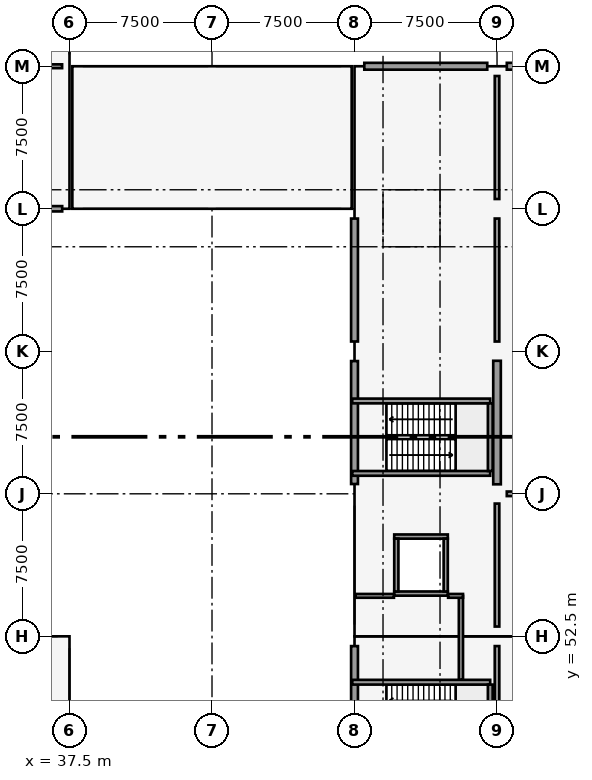
"""IFC4 building model, lengths in metres.
Left out: names, types, materials, properties, quantities, classifications, styles, units other than length and angle.
Written with IfcOpenShell. Run it as: python <this file> out.ifc"""

import sys

from ifc_helpers import new_model, si_unit, direction, frame, frame_2d, origin, origin_2d, place, context, subcontext, project, spatial, rectangle, extrude, element, fill, save


model = new_model("IFC4")
c1 = context("Model", 3, precision=1e-05, world=origin(), true_north=direction((0.0, 1.0)))
c2 = subcontext(c1, "Body", "Model", "MODEL_VIEW")
j1 = project(units=[si_unit("LENGTHUNIT", "METRE"), si_unit("PLANEANGLEUNIT", "RADIAN")], contexts=[c1])
p1 = place(None, origin())
s1 = spatial("IfcSite", under=j1, at=p1, CompositionType="ELEMENT")
p2 = place(p1, origin())
s2 = spatial("IfcBuilding", under=s1, at=p2, CompositionType="ELEMENT")
p3 = place(p2, origin())
s3 = spatial("IfcBuildingStorey", under=s2, at=p3, CompositionType="ELEMENT", Elevation=0.0)
for number, where, z_axis, x_axis in (
    (1, (52.5, 52.5, 0.0), (0.0, 0.0, 1.0), (1.0, 0.0, 0.0)),
    (2, (52.5, 60.0, 0.0), (0.0, 0.0, 1.0), (1.0, 0.0, 0.0)),
    (3, (52.5, 67.5, 0.0), (0.0, 0.0, 1.0), (1.0, 0.0, 0.0)),
    (4, (52.5, 75.0, 0.0), (0.0, 0.0, 1.0), (1.0, 0.0, 0.0)),
    (5, (52.5, 82.5, 0.0), (0.0, 0.0, 1.0), (1.0, 0.0, 0.0)),
    (6, (60.0, 52.5, 0.0), (0.0, 0.0, 1.0), (1.0, 0.0, 0.0)),
    (7, (60.0, 60.0, 0.0), (0.0, 0.0, 1.0), (1.0, 0.0, 0.0)),
    (8, (60.0, 67.5, 0.0), (0.0, 0.0, 1.0), (1.0, 0.0, 0.0)),
    (9, (60.0, 75.0, 0.0), (0.0, 0.0, 1.0), (1.0, 0.0, 0.0)),
    (10, (60.0, 82.5, 0.0), (0.0, 0.0, 1.0), (1.0, 0.0, 0.0)),
):
    element("IfcColumn", number, at=place(p3, frame(where, z_axis=z_axis, x_axis=x_axis)), inside=s3, PredefinedType="COLUMN", context=c2, shape_type="SweptSolid", body=[
        extrude(rectangle(XDim=1.0, YDim=1.0, at=origin_2d()), origin(), (0.0, 0.0, 1.0), 4.8),
    ])
for number, where, z_axis, x_axis in (
    (11, (37.5, 52.5, 0.0), (0.0, 0.0, 1.0), (1.0, 0.0, 0.0)),
    (12, (37.5, 75.0, 0.0), (0.0, 0.0, 1.0), (1.0, 0.0, 0.0)),
    (13, (37.5, 82.5, 0.0), (0.0, 0.0, 1.0), (1.0, 0.0, 0.0)),
):
    element("IfcColumn", number, at=place(p3, frame(where, z_axis=z_axis, x_axis=x_axis)), inside=s3, PredefinedType="COLUMN", context=c2, shape_type="SweptSolid", body=[
        extrude(rectangle(XDim=0.75, YDim=0.75, at=origin_2d()), origin(), (0.0, 0.0, 1.0), 4.8),
    ])
p4 = place(p3, frame((52.5, 71.25, 0.0), z_axis=(0.0, 0.0, 1.0), x_axis=(1.0, 0.0, 0.0)))
e14 = element("IfcColumn", 14, at=p4, inside=s3, PredefinedType="PILASTER", context=c2, shape_type="SweptSolid", body=[
    extrude(rectangle(XDim=0.45, YDim=0.85, at=origin_2d()), origin(), (0.0, 0.0, 1.0), 4.8),
])
p5 = place(p3, frame((60.0, 60.5, 0.0), z_axis=(0.0, 0.0, 1.0), x_axis=(0.0, 1.0, 0.0)))
e15 = element("IfcWall", 15, at=p5, inside=s3, PredefinedType="SHEAR", context=c2, shape_type="SweptSolid", body=[
    extrude(rectangle(XDim=6.5, YDim=0.4, at=frame_2d((3.25, 0.0))), origin(), (0.0, 0.0, 1.0), 3.0),
])
p6 = place(p3, frame((52.5, 45.515, 0.0), z_axis=(0.0, 0.0, 1.0), x_axis=(0.0, 1.0, 0.0)))
e16 = element("IfcWall", 16, at=p6, inside=s3, PredefinedType="SOLIDWALL", context=c2, shape_type="SweptSolid", body=[
    extrude(rectangle(XDim=6.47, YDim=0.36, at=frame_2d((3.235, 0.0))), origin(), (0.0, 0.0, 1.0), 3.67),
])
p7 = place(p6, frame((2.022, 0.0, 0.0)))
e17 = element("IfcOpeningElement", 17, at=p7, cuts=e16, PredefinedType="OPENING", context=c2, shape_type="SweptSolid", body=[
    extrude(rectangle(XDim=1.8, YDim=2.2, at=frame_2d((0.9, 1.1))), frame((0.0, 0.19, 0.0), z_axis=(0.0, -1.0, 0.0), x_axis=(1.0, 0.0, 0.0)), (0.0, 0.0, 1.0), 0.38),
])
p8 = place(p3, frame((52.5, 60.515, 0.0), z_axis=(0.0, 0.0, 1.0), x_axis=(0.0, 1.0, 0.0)))
e18 = element("IfcWall", 18, at=p8, inside=s3, PredefinedType="SOLIDWALL", context=c2, shape_type="SweptSolid", body=[
    extrude(rectangle(XDim=6.47, YDim=0.36, at=frame_2d((3.235, 0.0))), origin(), (0.0, 0.0, 1.0), 3.67),
])
p9 = place(p8, frame((2.022, 0.0, 0.0)))
e19 = element("IfcOpeningElement", 19, at=p9, cuts=e18, PredefinedType="OPENING", context=c2, shape_type="SweptSolid", body=[
    extrude(rectangle(XDim=1.8, YDim=2.2, at=frame_2d((0.9, 1.1))), frame((0.0, 0.19, 0.0), z_axis=(0.0, -1.0, 0.0), x_axis=(1.0, 0.0, 0.0)), (0.0, 0.0, 1.0), 0.38),
])
p10 = place(p3, frame((52.5, 68.015, 0.0), z_axis=(0.0, 0.0, 1.0), x_axis=(0.0, 1.0, 0.0)))
e20 = element("IfcWall", 20, at=p10, inside=s3, PredefinedType="SOLIDWALL", context=c2, shape_type="SweptSolid", body=[
    extrude(rectangle(XDim=6.47, YDim=0.36, at=frame_2d((3.235, 0.0))), origin(), (0.0, 0.0, 1.0), 3.67),
])
p11 = place(p3, frame((53.015, 82.5, 0.0), z_axis=(0.0, 0.0, 1.0), x_axis=(1.0, 0.0, 0.0)))
e21 = element("IfcWall", 21, at=p11, inside=s3, PredefinedType="SOLIDWALL", context=c2, shape_type="SweptSolid", body=[
    extrude(rectangle(XDim=6.47, YDim=0.36, at=frame_2d((3.235, 0.0))), origin(), (0.0, 0.0, 1.0), 3.72),
])
p12 = place(p11, frame((2.685, 0.0, 0.6)))
e22 = element("IfcOpeningElement", 22, at=p12, cuts=e21, PredefinedType="OPENING", context=c2, shape_type="SweptSolid", body=[
    extrude(rectangle(XDim=1.1, YDim=1.8, at=frame_2d((0.55, 0.9))), frame((0.0, 0.19, 0.0), z_axis=(0.0, -1.0, 0.0), x_axis=(1.0, 0.0, 0.0)), (0.0, 0.0, 1.0), 0.38),
])
p13 = place(p3, frame((60.515, 82.5, 0.0), z_axis=(0.0, 0.0, 1.0), x_axis=(1.0, 0.0, 0.0)))
e23 = element("IfcWall", 23, at=p13, inside=s3, PredefinedType="SOLIDWALL", context=c2, shape_type="SweptSolid", body=[
    extrude(rectangle(XDim=6.52, YDim=0.36, at=frame_2d((3.26, 0.0))), origin(), (0.0, 0.0, 1.0), 3.72),
])
p14 = place(p13, frame((2.61, 0.0, 0.6)))
e24 = element("IfcOpeningElement", 24, at=p14, cuts=e23, PredefinedType="OPENING", context=c2, shape_type="SweptSolid", body=[
    extrude(rectangle(XDim=1.25, YDim=1.8, at=frame_2d((0.625, 0.9))), frame((0.0, 0.19, 0.0), z_axis=(0.0, -1.0, 0.0), x_axis=(1.0, 0.0, 0.0)), (0.0, 0.0, 1.0), 0.38),
])
p15 = place(p3, frame((30.385, 75.0, 0.0), z_axis=(0.0, 0.0, 1.0), x_axis=(1.0, 0.0, 0.0)))
e25 = element("IfcWall", 25, at=p15, inside=s3, PredefinedType="SOLIDWALL", context=c2, shape_type="SweptSolid", body=[
    extrude(rectangle(XDim=6.73, YDim=0.28, at=frame_2d((3.365, 0.0))), origin(), (0.0, 0.0, 1.0), 3.72),
])
p16 = place(p15, frame((2.79, 0.0, 0.6)))
e26 = element("IfcOpeningElement", 26, at=p16, cuts=e25, PredefinedType="OPENING", context=c2, shape_type="SweptSolid", body=[
    extrude(rectangle(XDim=1.15, YDim=1.3, at=frame_2d((0.575, 0.65))), frame((0.0, 0.15, 0.0), z_axis=(0.0, -1.0, 0.0), x_axis=(1.0, 0.0, 0.0)), (0.0, 0.0, 1.0), 0.3),
])
p17 = place(p3, frame((52.38, 50.085, 0.0), z_axis=(0.0, 0.0, 1.0), x_axis=(1.0, 0.0, 0.0)))
e27 = element("IfcWall", 27, at=p17, inside=s3, PredefinedType="SOLIDWALL", context=c2, shape_type="SweptSolid", body=[
    extrude(rectangle(XDim=7.26, YDim=0.25, at=frame_2d((3.63, 0.0))), origin(), (0.0, 0.0, 1.0), 4.5),
])
p18 = place(p17, frame((0.62, 0.0, 0.0)))
e28 = element("IfcOpeningElement", 28, at=p18, cuts=e27, PredefinedType="OPENING", context=c2, shape_type="SweptSolid", body=[
    extrude(rectangle(XDim=1.1, YDim=2.15, at=frame_2d((0.55, 1.075))), frame((0.0, 0.135, 0.0), z_axis=(0.0, -1.0, 0.0), x_axis=(1.0, 0.0, 0.0)), (0.0, 0.0, 1.0), 0.27),
])
p19 = place(p3, frame((59.645, 46.4, 0.0), z_axis=(0.0, 0.0, 1.0), x_axis=(0.0, 1.0, 0.0)))
e29 = element("IfcWall", 29, at=p19, inside=s3, PredefinedType="SOLIDWALL", context=c2, shape_type="SweptSolid", body=[
    extrude(rectangle(XDim=3.56, YDim=0.25, at=frame_2d((1.78, 0.0))), origin(), (0.0, 0.0, 1.0), 4.5),
])
p20 = place(p3, frame((52.38, 61.075, 0.0), z_axis=(0.0, 0.0, 1.0), x_axis=(1.0, 0.0, 0.0)))
e30 = element("IfcWall", 30, at=p20, inside=s3, PredefinedType="SOLIDWALL", context=c2, shape_type="SweptSolid", body=[
    extrude(rectangle(XDim=7.26, YDim=0.25, at=frame_2d((3.63, 0.0))), origin(), (0.0, 0.0, 1.0), 4.5),
])
p21 = place(p20, frame((0.62, 0.0, 0.0)))
e31 = element("IfcOpeningElement", 31, at=p21, cuts=e30, PredefinedType="OPENING", context=c2, shape_type="SweptSolid", body=[
    extrude(rectangle(XDim=1.1, YDim=2.15, at=frame_2d((0.55, 1.075))), frame((0.0, 0.135, 0.0), z_axis=(0.0, -1.0, 0.0), x_axis=(1.0, 0.0, 0.0)), (0.0, 0.0, 1.0), 0.27),
])
p22 = place(p3, frame((52.38, 64.885, 0.0), z_axis=(0.0, 0.0, 1.0), x_axis=(1.0, 0.0, 0.0)))
e32 = element("IfcWall", 32, at=p22, inside=s3, PredefinedType="SOLIDWALL", context=c2, shape_type="SweptSolid", body=[
    extrude(rectangle(XDim=7.26, YDim=0.25, at=frame_2d((3.63, 0.0))), origin(), (0.0, 0.0, 1.0), 4.5),
])
p23 = place(p22, frame((0.62, 0.0, 0.0)))
e33 = element("IfcOpeningElement", 33, at=p23, cuts=e32, PredefinedType="OPENING", context=c2, shape_type="SweptSolid", body=[
    extrude(rectangle(XDim=1.1, YDim=2.15, at=frame_2d((0.55, 1.075))), frame((0.0, 0.135, 0.0), z_axis=(0.0, -1.0, 0.0), x_axis=(1.0, 0.0, 0.0)), (0.0, 0.0, 1.0), 0.27),
])
p24 = place(p3, frame((59.645, 61.2, 0.0), z_axis=(0.0, 0.0, 1.0), x_axis=(0.0, 1.0, 0.0)))
e34 = element("IfcWall", 34, at=p24, inside=s3, PredefinedType="SOLIDWALL", context=c2, shape_type="SweptSolid", body=[
    extrude(rectangle(XDim=3.56, YDim=0.25, at=frame_2d((1.78, 0.0))), origin(), (0.0, 0.0, 1.0), 4.5),
])
p25 = place(p3, frame((54.59, 54.75, 0.0), z_axis=(0.0, 0.0, 1.0), x_axis=(1.0, 0.0, 0.0)))
e35 = element("IfcWall", 35, at=p25, inside=s3, PredefinedType="SOLIDWALL", context=c2, shape_type="SweptSolid", body=[
    extrude(rectangle(XDim=2.82, YDim=0.22, at=frame_2d((1.41, 0.0))), origin(), (0.0, 0.0, 1.0), 4.5),
])
p26 = place(p25, frame((0.86, 0.0, 0.0)))
e36 = element("IfcOpeningElement", 36, at=p26, cuts=e35, PredefinedType="OPENING", context=c2, shape_type="SweptSolid", body=[
    extrude(rectangle(XDim=1.1, YDim=2.15, at=frame_2d((0.55, 1.075))), frame((0.0, 0.12, 0.0), z_axis=(0.0, -1.0, 0.0), x_axis=(1.0, 0.0, 0.0)), (0.0, 0.0, 1.0), 0.24),
])
p27 = place(p3, frame((54.59, 57.75, 0.0), z_axis=(0.0, 0.0, 1.0), x_axis=(1.0, 0.0, 0.0)))
e37 = element("IfcWall", 37, at=p27, inside=s3, PredefinedType="SOLIDWALL", context=c2, shape_type="SweptSolid", body=[
    extrude(rectangle(XDim=2.82, YDim=0.22, at=frame_2d((1.41, 0.0))), origin(), (0.0, 0.0, 1.0), 4.5),
])
for number, where, z_axis, x_axis in (
    (38, (54.7, 54.86, 0.0), (0.0, 0.0, 1.0), (0.0, 1.0, 0.0)),
    (39, (57.3, 54.86, 0.0), (0.0, 0.0, 1.0), (0.0, 1.0, 0.0)),
):
    element("IfcWall", number, at=place(p3, frame(where, z_axis=z_axis, x_axis=x_axis)), inside=s3, PredefinedType="SOLIDWALL", context=c2, shape_type="SweptSolid", body=[
        extrude(rectangle(XDim=2.78, YDim=0.22, at=frame_2d((1.39, 0.0))), origin(), (0.0, 0.0, 1.0), 4.5),
    ])
p28 = place(p3, frame((58.1, 50.22, 0.0), z_axis=(0.0, 0.0, 1.0), x_axis=(0.0, 1.0, 0.0)))
e40 = element("IfcWall", 40, at=p28, inside=s3, PredefinedType="SOLIDWALL", context=c2, shape_type="SweptSolid", body=[
    extrude(rectangle(XDim=4.41, YDim=0.22, at=frame_2d((2.205, 0.0))), origin(), (0.0, 0.0, 1.0), 4.5),
])
p29 = place(p28, frame((0.45, 0.0, 0.0)))
e41 = element("IfcOpeningElement", 41, at=p29, cuts=e40, PredefinedType="OPENING", context=c2, shape_type="SweptSolid", body=[
    extrude(rectangle(XDim=1.1, YDim=2.15, at=frame_2d((0.55, 1.075))), frame((0.0, 0.12, 0.0), z_axis=(0.0, -1.0, 0.0), x_axis=(1.0, 0.0, 0.0)), (0.0, 0.0, 1.0), 0.24),
])
p30 = place(p3, frame((52.56, 54.63, 0.0), z_axis=(0.0, 0.0, 1.0), x_axis=(1.0, 0.0, 0.0)))
e42 = element("IfcWall", 42, at=p30, inside=s3, PredefinedType="PARTITIONING", context=c2, shape_type="SweptSolid", body=[
    extrude(rectangle(XDim=2.015, YDim=0.2, at=frame_2d((1.007, 0.0))), origin(), (0.0, 0.0, 1.0), 3.88),
])
p31 = place(p3, frame((57.425, 54.63, 0.0), z_axis=(0.0, 0.0, 1.0), x_axis=(1.0, 0.0, 0.0)))
e43 = element("IfcWall", 43, at=p31, inside=s3, PredefinedType="PARTITIONING", context=c2, shape_type="SweptSolid", body=[
    extrude(rectangle(XDim=0.785, YDim=0.2, at=frame_2d((0.393, 0.0))), origin(), (0.0, 0.0, 1.0), 4.48),
])
p32 = place(p3, frame((30.389, 82.5, 0.0), z_axis=(0.0, 0.0, 1.0), x_axis=(1.0, 0.0, 0.0)))
e44 = element("IfcWall", 44, at=p32, inside=s3, PredefinedType="PARTITIONING", context=c2, shape_type="SweptSolid", body=[
    extrude(rectangle(XDim=6.722, YDim=0.2, at=frame_2d((3.361, 0.0))), origin(), (0.0, 0.0, 1.0), 3.42),
])
p33 = place(p3, frame((60.514, 60.0, 0.0), z_axis=(0.0, 0.0, 1.0), x_axis=(1.0, 0.0, 0.0)))
e45 = element("IfcWall", 45, at=p33, inside=s3, PredefinedType="PARTITIONING", context=c2, shape_type="SweptSolid", body=[
    extrude(rectangle(XDim=14.022, YDim=0.24, at=frame_2d((7.011, 0.0))), origin(), (0.0, 0.0, 1.0), 2.97),
])
p34 = place(p33, frame((2.436, 0.0, 0.0)))
e46 = element("IfcOpeningElement", 46, at=p34, cuts=e45, PredefinedType="OPENING", context=c2, shape_type="SweptSolid", body=[
    extrude(rectangle(XDim=1.6, YDim=2.15, at=frame_2d((0.8, 1.075))), frame((0.0, 0.13, 0.0), z_axis=(0.0, -1.0, 0.0), x_axis=(1.0, 0.0, 0.0)), (0.0, 0.0, 1.0), 0.26),
])
p35 = place(p3, frame((60.0, 45.514, 0.0), z_axis=(0.0, 0.0, 1.0), x_axis=(0.0, 1.0, 0.0)))
e47 = element("IfcWall", 47, at=p35, inside=s3, PredefinedType="PARTITIONING", context=c2, shape_type="SweptSolid", body=[
    extrude(rectangle(XDim=6.472, YDim=0.24, at=frame_2d((3.236, 0.0))), origin(), (0.0, 0.0, 1.0), 2.97),
])
p36 = place(p3, frame((60.0, 53.014, 0.0), z_axis=(0.0, 0.0, 1.0), x_axis=(0.0, 1.0, 0.0)))
e48 = element("IfcWall", 48, at=p36, inside=s3, PredefinedType="PARTITIONING", context=c2, shape_type="SweptSolid", body=[
    extrude(rectangle(XDim=6.472, YDim=0.24, at=frame_2d((3.236, 0.0))), origin(), (0.0, 0.0, 1.0), 2.97),
])
p37 = place(p36, frame((2.436, 0.0, 0.0)))
e49 = element("IfcOpeningElement", 49, at=p37, cuts=e48, PredefinedType="OPENING", context=c2, shape_type="SweptSolid", body=[
    extrude(rectangle(XDim=1.6, YDim=2.15, at=frame_2d((0.8, 1.075))), frame((0.0, 0.13, 0.0), z_axis=(0.0, -1.0, 0.0), x_axis=(1.0, 0.0, 0.0)), (0.0, 0.0, 1.0), 0.26),
])
p38 = place(p3, frame((60.0, 68.014, 0.0), z_axis=(0.0, 0.0, 1.0), x_axis=(0.0, 1.0, 0.0)))
e50 = element("IfcWall", 50, at=p38, inside=s3, PredefinedType="PARTITIONING", context=c2, shape_type="SweptSolid", body=[
    extrude(rectangle(XDim=6.472, YDim=0.24, at=frame_2d((3.236, 0.0))), origin(), (0.0, 0.0, 1.0), 2.97),
])
p39 = place(p38, frame((2.436, 0.0, 0.0)))
e51 = element("IfcOpeningElement", 51, at=p39, cuts=e50, PredefinedType="OPENING", context=c2, shape_type="SweptSolid", body=[
    extrude(rectangle(XDim=1.6, YDim=2.15, at=frame_2d((0.8, 1.075))), frame((0.0, 0.13, 0.0), z_axis=(0.0, -1.0, 0.0), x_axis=(1.0, 0.0, 0.0)), (0.0, 0.0, 1.0), 0.26),
])
p40 = place(p3, frame((60.0, 75.514, 0.0), z_axis=(0.0, 0.0, 1.0), x_axis=(0.0, 1.0, 0.0)))
e52 = element("IfcWall", 52, at=p40, inside=s3, PredefinedType="PARTITIONING", context=c2, shape_type="SweptSolid", body=[
    extrude(rectangle(XDim=6.472, YDim=0.24, at=frame_2d((3.236, 0.0))), origin(), (0.0, 0.0, 1.0), 3.57),
])
p41 = place(p7, origin())
e53 = element("IfcDoor", 53, at=p41, inside=s3, OperationType="SINGLE_SWING_RIGHT", PredefinedType="DOOR", context=c2, shape_type="SweptSolid", body=[
    extrude(rectangle(XDim=1.8, YDim=2.2, at=frame_2d((0.9, 1.1))), frame((0.0, 0.025, 0.0), z_axis=(0.0, -1.0, 0.0), x_axis=(1.0, 0.0, 0.0)), (0.0, 0.0, 1.0), 0.05),
])
fill(e17, e53)
p42 = place(p9, origin())
e54 = element("IfcDoor", 54, at=p42, inside=s3, OperationType="SINGLE_SWING_RIGHT", PredefinedType="DOOR", context=c2, shape_type="SweptSolid", body=[
    extrude(rectangle(XDim=1.8, YDim=2.2, at=frame_2d((0.9, 1.1))), frame((0.0, 0.025, 0.0), z_axis=(0.0, -1.0, 0.0), x_axis=(1.0, 0.0, 0.0)), (0.0, 0.0, 1.0), 0.05),
])
fill(e19, e54)
p43 = place(p12, origin())
e55 = element("IfcWindow", 55, at=p43, inside=s3, PartitioningType="SINGLE_PANEL", PredefinedType="WINDOW", context=c2, shape_type="SweptSolid", body=[
    extrude(rectangle(XDim=1.1, YDim=1.8, at=frame_2d((0.55, 0.9))), frame((0.0, 0.03, 0.0), z_axis=(0.0, -1.0, 0.0), x_axis=(1.0, 0.0, 0.0)), (0.0, 0.0, 1.0), 0.06),
])
fill(e22, e55)
p44 = place(p18, frame((1.1, 0.0, 0.0), z_axis=(0.0, 0.0, 1.0), x_axis=(-1.0, 0.0, 0.0)))
e56 = element("IfcDoor", 56, at=p44, inside=s3, OperationType="SINGLE_SWING_RIGHT", PredefinedType="DOOR", context=c2, shape_type="SweptSolid", body=[
    extrude(rectangle(XDim=1.1, YDim=2.15, at=frame_2d((0.55, 1.075))), frame((0.0, 0.025, 0.0), z_axis=(0.0, -1.0, 0.0), x_axis=(1.0, 0.0, 0.0)), (0.0, 0.0, 1.0), 0.05),
])
fill(e28, e56)
p45 = place(p21, origin())
e57 = element("IfcDoor", 57, at=p45, inside=s3, OperationType="SINGLE_SWING_LEFT", PredefinedType="DOOR", context=c2, shape_type="SweptSolid", body=[
    extrude(rectangle(XDim=1.1, YDim=2.15, at=frame_2d((0.55, 1.075))), frame((0.0, 0.025, 0.0), z_axis=(0.0, -1.0, 0.0), x_axis=(1.0, 0.0, 0.0)), (0.0, 0.0, 1.0), 0.05),
])
fill(e31, e57)
p46 = place(p23, frame((1.1, 0.0, 0.0), z_axis=(0.0, 0.0, 1.0), x_axis=(-1.0, 0.0, 0.0)))
e58 = element("IfcDoor", 58, at=p46, inside=s3, OperationType="SINGLE_SWING_RIGHT", PredefinedType="DOOR", context=c2, shape_type="SweptSolid", body=[
    extrude(rectangle(XDim=1.1, YDim=2.15, at=frame_2d((0.55, 1.075))), frame((0.0, 0.025, 0.0), z_axis=(0.0, -1.0, 0.0), x_axis=(1.0, 0.0, 0.0)), (0.0, 0.0, 1.0), 0.05),
])
fill(e33, e58)
p47 = place(p26, origin())
e59 = element("IfcDoor", 59, at=p47, inside=s3, OperationType="SLIDING_TO_LEFT", PredefinedType="DOOR", context=c2, shape_type="SweptSolid", body=[
    extrude(rectangle(XDim=1.1, YDim=2.15, at=frame_2d((0.55, 1.075))), frame((0.0, 0.025, 0.0), z_axis=(0.0, -1.0, 0.0), x_axis=(1.0, 0.0, 0.0)), (0.0, 0.0, 1.0), 0.05),
])
fill(e36, e59)
p48 = place(p29, origin())
e60 = element("IfcDoor", 60, at=p48, inside=s3, OperationType="SINGLE_SWING_RIGHT", PredefinedType="DOOR", context=c2, shape_type="SweptSolid", body=[
    extrude(rectangle(XDim=1.1, YDim=2.15, at=frame_2d((0.55, 1.075))), frame((0.0, 0.025, 0.0), z_axis=(0.0, -1.0, 0.0), x_axis=(1.0, 0.0, 0.0)), (0.0, 0.0, 1.0), 0.05),
])
fill(e41, e60)
p49 = place(p37, origin())
e61 = element("IfcDoor", 61, at=p49, inside=s3, OperationType="SINGLE_SWING_RIGHT", PredefinedType="DOOR", context=c2, shape_type="SweptSolid", body=[
    extrude(rectangle(XDim=1.6, YDim=2.15, at=frame_2d((0.8, 1.075))), frame((0.0, 0.025, 0.0), z_axis=(0.0, -1.0, 0.0), x_axis=(1.0, 0.0, 0.0)), (0.0, 0.0, 1.0), 0.05),
])
fill(e49, e61)
p50 = place(p39, origin())
e62 = element("IfcDoor", 62, at=p50, inside=s3, OperationType="SINGLE_SWING_LEFT", PredefinedType="DOOR", context=c2, shape_type="SweptSolid", body=[
    extrude(rectangle(XDim=1.6, YDim=2.15, at=frame_2d((0.8, 1.075))), frame((0.0, 0.025, 0.0), z_axis=(0.0, -1.0, 0.0), x_axis=(1.0, 0.0, 0.0)), (0.0, 0.0, 1.0), 0.05),
])
fill(e51, e62)
save(model, sys.argv[1])
